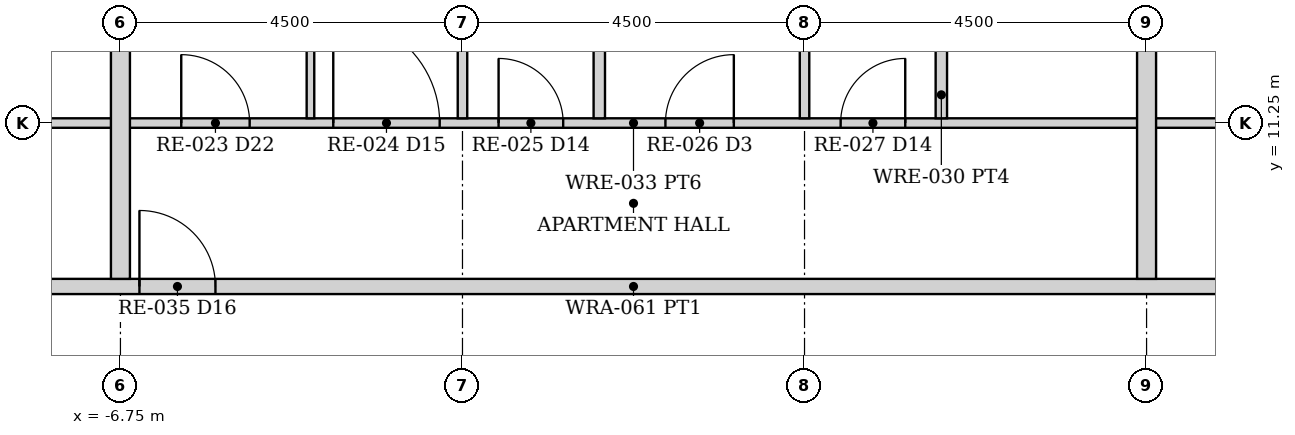
"""IFC4 building model, lengths in metres.
Left out: names, types, materials, properties, quantities, classifications, styles, units other than length and angle.
Written with IfcOpenShell. Run it as: python <this file> out.ifc"""

import sys

from ifc_helpers import new_model, si_unit, direction, frame, frame_2d, origin, place, context, subcontext, project, spatial, rectangle, extrude, element, fill, save


model = new_model("IFC4")
c1 = context("Model", 3, precision=1e-05, world=origin(), true_north=direction((0.0, 1.0)))
c2 = subcontext(c1, "Body", "Model", "MODEL_VIEW")
j1 = project(units=[si_unit("LENGTHUNIT", "METRE"), si_unit("PLANEANGLEUNIT", "RADIAN")], contexts=[c1])
p1 = place(None, origin())
s1 = spatial("IfcSite", under=j1, at=p1, CompositionType="ELEMENT")
p2 = place(p1, origin())
s2 = spatial("IfcBuilding", under=s1, at=p2, CompositionType="ELEMENT")
p3 = place(p2, frame((0.0, 0.0, 68.5)))
s3 = spatial("IfcBuildingStorey", under=s2, at=p3, CompositionType="ELEMENT", Elevation=68.5)
p4 = place(p3, frame((-24.55, 9.1, 0.0), z_axis=(0.0, 0.0, 1.0), x_axis=(1.0, 0.0, 0.0)))
e1 = element("IfcWall", 1, at=p4, inside=s3, PredefinedType="PARTITIONING", context=c2, shape_type="SweptSolid", body=[
    extrude(rectangle(XDim=49.1, YDim=0.2, at=frame_2d((24.55, 0.0))), origin(), (0.0, 0.0, 1.0), 2.373),
])
p5 = place(p4, frame((5.05, 0.0, 0.0)))
e2 = element("IfcOpeningElement", 2, at=p5, cuts=e1, PredefinedType="OPENING", context=c2, shape_type="SweptSolid", body=[
    extrude(rectangle(XDim=1.0, YDim=2.3, at=frame_2d((0.5, 1.15))), frame((0.0, 0.11, 0.0), z_axis=(0.0, -1.0, 0.0), x_axis=(1.0, 0.0, 0.0)), (0.0, 0.0, 1.0), 0.22),
])
p6 = place(p4, frame((18.05, 0.0, 0.0)))
e3 = element("IfcOpeningElement", 3, at=p6, cuts=e1, PredefinedType="OPENING", context=c2, shape_type="SweptSolid", body=[
    extrude(rectangle(XDim=1.0, YDim=2.3, at=frame_2d((0.5, 1.15))), frame((0.0, 0.11, 0.0), z_axis=(0.0, -1.0, 0.0), x_axis=(1.0, 0.0, 0.0)), (0.0, 0.0, 1.0), 0.22),
])
p7 = place(p4, frame((43.05, 0.0, 0.0)))
e4 = element("IfcOpeningElement", 4, at=p7, cuts=e1, PredefinedType="OPENING", context=c2, shape_type="SweptSolid", body=[
    extrude(rectangle(XDim=1.0, YDim=2.3, at=frame_2d((0.5, 1.15))), frame((0.0, 0.11, 0.0), z_axis=(0.0, -1.0, 0.0), x_axis=(1.0, 0.0, 0.0)), (0.0, 0.0, 1.0), 0.22),
])
p8 = place(p3, frame((-24.35, 11.25, 0.0), z_axis=(0.0, 0.0, 1.0), x_axis=(1.0, 0.0, 0.0)))
e5 = element("IfcWall", 5, at=p8, inside=s3, PredefinedType="PARTITIONING", context=c2, shape_type="SweptSolid", body=[
    extrude(rectangle(XDim=17.5, YDim=0.125, at=frame_2d((8.75, 0.0))), origin(), (0.0, 0.0, 1.0), 2.373),
])
p9 = place(p8, frame((2.625, 0.0, 0.0)))
e6 = element("IfcOpeningElement", 6, at=p9, cuts=e5, PredefinedType="OPENING", context=c2, shape_type="SweptSolid", body=[
    extrude(rectangle(XDim=0.9, YDim=2.1, at=frame_2d((0.45, 1.05))), frame((0.0, 0.073, 0.0), z_axis=(0.0, -1.0, 0.0), x_axis=(1.0, 0.0, 0.0)), (0.0, 0.0, 1.0), 0.145),
])
p10 = place(p8, frame((0.35, 0.0, 0.0)))
e7 = element("IfcOpeningElement", 7, at=p10, cuts=e5, PredefinedType="OPENING", context=c2, shape_type="SweptSolid", body=[
    extrude(rectangle(XDim=1.4, YDim=2.1, at=frame_2d((0.7, 1.05))), frame((0.0, 0.073, 0.0), z_axis=(0.0, -1.0, 0.0), x_axis=(1.0, 0.0, 0.0)), (0.0, 0.0, 1.0), 0.145),
])
p11 = place(p8, frame((4.575, 0.0, 0.0)))
e8 = element("IfcOpeningElement", 8, at=p11, cuts=e5, PredefinedType="OPENING", context=c2, shape_type="SweptSolid", body=[
    extrude(rectangle(XDim=0.85, YDim=2.1, at=frame_2d((0.425, 1.05))), frame((0.0, 0.073, 0.0), z_axis=(0.0, -1.0, 0.0), x_axis=(1.0, 0.0, 0.0)), (0.0, 0.0, 1.0), 0.145),
])
p12 = place(p8, frame((6.77, 0.0, 0.0)))
e9 = element("IfcOpeningElement", 9, at=p12, cuts=e5, PredefinedType="OPENING", context=c2, shape_type="SweptSolid", body=[
    extrude(rectangle(XDim=0.9, YDim=2.1, at=frame_2d((0.45, 1.05))), frame((0.0, 0.073, 0.0), z_axis=(0.0, -1.0, 0.0), x_axis=(1.0, 0.0, 0.0)), (0.0, 0.0, 1.0), 0.145),
])
p13 = place(p8, frame((9.075, 0.0, 0.0)))
e10 = element("IfcOpeningElement", 10, at=p13, cuts=e5, PredefinedType="OPENING", context=c2, shape_type="SweptSolid", body=[
    extrude(rectangle(XDim=0.85, YDim=2.1, at=frame_2d((0.425, 1.05))), frame((0.0, 0.073, 0.0), z_axis=(0.0, -1.0, 0.0), x_axis=(1.0, 0.0, 0.0)), (0.0, 0.0, 1.0), 0.145),
])
p14 = place(p8, frame((13.575, 0.0, 0.0)))
e11 = element("IfcOpeningElement", 11, at=p14, cuts=e5, PredefinedType="OPENING", context=c2, shape_type="SweptSolid", body=[
    extrude(rectangle(XDim=0.85, YDim=2.1, at=frame_2d((0.425, 1.05))), frame((0.0, 0.073, 0.0), z_axis=(0.0, -1.0, 0.0), x_axis=(1.0, 0.0, 0.0)), (0.0, 0.0, 1.0), 0.145),
])
p15 = place(p3, frame((-6.65, 11.25, 0.0), z_axis=(0.0, 0.0, 1.0), x_axis=(1.0, 0.0, 0.0)))
e12 = element("IfcWall", 12, at=p15, inside=s3, PredefinedType="PARTITIONING", context=c2, shape_type="SweptSolid", body=[
    extrude(rectangle(XDim=13.3, YDim=0.125, at=frame_2d((6.65, 0.0))), origin(), (0.0, 0.0, 1.0), 2.373),
])
p16 = place(p15, frame((0.7, 0.0, 0.0)))
e13 = element("IfcOpeningElement", 13, at=p16, cuts=e12, PredefinedType="OPENING", context=c2, shape_type="SweptSolid", body=[
    extrude(rectangle(XDim=0.9, YDim=2.1, at=frame_2d((0.45, 1.05))), frame((0.0, 0.073, 0.0), z_axis=(0.0, -1.0, 0.0), x_axis=(1.0, 0.0, 0.0)), (0.0, 0.0, 1.0), 0.145),
])
p17 = place(p15, frame((2.7, 0.0, 0.0)))
e14 = element("IfcOpeningElement", 14, at=p17, cuts=e12, PredefinedType="OPENING", context=c2, shape_type="SweptSolid", body=[
    extrude(rectangle(XDim=1.4, YDim=2.1, at=frame_2d((0.7, 1.05))), frame((0.0, 0.073, 0.0), z_axis=(0.0, -1.0, 0.0), x_axis=(1.0, 0.0, 0.0)), (0.0, 0.0, 1.0), 0.145),
])
p18 = place(p15, frame((4.875, 0.0, 0.0)))
e15 = element("IfcOpeningElement", 15, at=p18, cuts=e12, PredefinedType="OPENING", context=c2, shape_type="SweptSolid", body=[
    extrude(rectangle(XDim=0.85, YDim=2.1, at=frame_2d((0.425, 1.05))), frame((0.0, 0.073, 0.0), z_axis=(0.0, -1.0, 0.0), x_axis=(1.0, 0.0, 0.0)), (0.0, 0.0, 1.0), 0.145),
])
p19 = place(p15, frame((7.07, 0.0, 0.0)))
e16 = element("IfcOpeningElement", 16, at=p19, cuts=e12, PredefinedType="OPENING", context=c2, shape_type="SweptSolid", body=[
    extrude(rectangle(XDim=0.9, YDim=2.1, at=frame_2d((0.45, 1.05))), frame((0.0, 0.073, 0.0), z_axis=(0.0, -1.0, 0.0), x_axis=(1.0, 0.0, 0.0)), (0.0, 0.0, 1.0), 0.145),
])
p20 = place(p15, frame((9.375, 0.0, 0.0)))
e17 = element("IfcOpeningElement", 17, at=p20, cuts=e12, PredefinedType="OPENING", context=c2, shape_type="SweptSolid", body=[
    extrude(rectangle(XDim=0.85, YDim=2.1, at=frame_2d((0.425, 1.05))), frame((0.0, 0.073, 0.0), z_axis=(0.0, -1.0, 0.0), x_axis=(1.0, 0.0, 0.0)), (0.0, 0.0, 1.0), 0.145),
])
p21 = place(p3, frame((-4.25, 11.312, 0.0), z_axis=(0.0, 0.0, 1.0), x_axis=(0.0, 1.0, 0.0)))
e18 = element("IfcWall", 18, at=p21, inside=s3, PredefinedType="PARTITIONING", context=c2, shape_type="SweptSolid", body=[
    extrude(rectangle(XDim=4.53, YDim=0.1, at=frame_2d((2.265, 0.0))), origin(), (0.0, 0.0, 1.0), 2.373),
])
p22 = place(p3, frame((-2.25, 11.312, 0.0), z_axis=(0.0, 0.0, 1.0), x_axis=(0.0, 1.0, 0.0)))
e19 = element("IfcWall", 19, at=p22, inside=s3, PredefinedType="PARTITIONING", context=c2, shape_type="SweptSolid", body=[
    extrude(rectangle(XDim=13.038, YDim=0.125, at=frame_2d((6.519, 0.0))), origin(), (0.0, 0.0, 1.0), 2.373),
])
p23 = place(p3, frame((-0.45, 11.312, 0.0), z_axis=(0.0, 0.0, 1.0), x_axis=(0.0, 1.0, 0.0)))
e20 = element("IfcWall", 20, at=p23, inside=s3, PredefinedType="PARTITIONING", context=c2, shape_type="SweptSolid", body=[
    extrude(rectangle(XDim=3.087, YDim=0.15, at=frame_2d((1.544, 0.0))), origin(), (0.0, 0.0, 1.0), 2.373),
])
p24 = place(p23, frame((1.087, 0.0, 0.0)))
e21 = element("IfcOpeningElement", 21, at=p24, cuts=e20, PredefinedType="OPENING", context=c2, shape_type="SweptSolid", body=[
    extrude(rectangle(XDim=0.8, YDim=2.1, at=frame_2d((0.4, 1.05))), frame((0.0, 0.085, 0.0), z_axis=(0.0, -1.0, 0.0), x_axis=(1.0, 0.0, 0.0)), (0.0, 0.0, 1.0), 0.17),
])
p25 = place(p3, frame((2.25, 11.312, 0.0), z_axis=(0.0, 0.0, 1.0), x_axis=(0.0, 1.0, 0.0)))
e22 = element("IfcWall", 22, at=p25, inside=s3, PredefinedType="PARTITIONING", context=c2, shape_type="SweptSolid", body=[
    extrude(rectangle(XDim=13.038, YDim=0.125, at=frame_2d((6.519, 0.0))), origin(), (0.0, 0.0, 1.0), 2.373),
])
p26 = place(p3, frame((4.05, 11.312, 0.0), z_axis=(0.0, 0.0, 1.0), x_axis=(0.0, 1.0, 0.0)))
e23 = element("IfcWall", 23, at=p26, inside=s3, PredefinedType="PARTITIONING", context=c2, shape_type="SweptSolid", body=[
    extrude(rectangle(XDim=3.087, YDim=0.15, at=frame_2d((1.544, 0.0))), origin(), (0.0, 0.0, 1.0), 2.373),
])
p27 = place(p26, frame((1.087, 0.0, 0.0)))
e24 = element("IfcOpeningElement", 24, at=p27, cuts=e23, PredefinedType="OPENING", context=c2, shape_type="SweptSolid", body=[
    extrude(rectangle(XDim=0.8, YDim=2.1, at=frame_2d((0.4, 1.05))), frame((0.0, 0.085, 0.0), z_axis=(0.0, -1.0, 0.0), x_axis=(1.0, 0.0, 0.0)), (0.0, 0.0, 1.0), 0.17),
])
p28 = place(p3, frame((6.85, 11.25, 0.0), z_axis=(0.0, 0.0, 1.0), x_axis=(1.0, 0.0, 0.0)))
e25 = element("IfcWall", 25, at=p28, inside=s3, PredefinedType="PARTITIONING", context=c2, shape_type="SweptSolid", body=[
    extrude(rectangle(XDim=17.5, YDim=0.125, at=frame_2d((8.75, 0.0))), origin(), (0.0, 0.0, 1.0), 2.373),
])
p29 = place(p28, frame((13.975, 0.0, 0.0)))
e26 = element("IfcOpeningElement", 26, at=p29, cuts=e25, PredefinedType="OPENING", context=c2, shape_type="SweptSolid", body=[
    extrude(rectangle(XDim=0.9, YDim=2.1, at=frame_2d((0.45, 1.05))), frame((0.0, 0.073, 0.0), z_axis=(0.0, -1.0, 0.0), x_axis=(1.0, 0.0, 0.0)), (0.0, 0.0, 1.0), 0.145),
])
p30 = place(p28, frame((15.75, 0.0, 0.0)))
e27 = element("IfcOpeningElement", 27, at=p30, cuts=e25, PredefinedType="OPENING", context=c2, shape_type="SweptSolid", body=[
    extrude(rectangle(XDim=1.4, YDim=2.1, at=frame_2d((0.7, 1.05))), frame((0.0, 0.073, 0.0), z_axis=(0.0, -1.0, 0.0), x_axis=(1.0, 0.0, 0.0)), (0.0, 0.0, 1.0), 0.145),
])
p31 = place(p28, frame((12.075, 0.0, 0.0)))
e28 = element("IfcOpeningElement", 28, at=p31, cuts=e25, PredefinedType="OPENING", context=c2, shape_type="SweptSolid", body=[
    extrude(rectangle(XDim=0.85, YDim=2.1, at=frame_2d((0.425, 1.05))), frame((0.0, 0.073, 0.0), z_axis=(0.0, -1.0, 0.0), x_axis=(1.0, 0.0, 0.0)), (0.0, 0.0, 1.0), 0.145),
])
p32 = place(p28, frame((9.83, 0.0, 0.0)))
e29 = element("IfcOpeningElement", 29, at=p32, cuts=e25, PredefinedType="OPENING", context=c2, shape_type="SweptSolid", body=[
    extrude(rectangle(XDim=0.9, YDim=2.1, at=frame_2d((0.45, 1.05))), frame((0.0, 0.073, 0.0), z_axis=(0.0, -1.0, 0.0), x_axis=(1.0, 0.0, 0.0)), (0.0, 0.0, 1.0), 0.145),
])
p33 = place(p28, frame((7.575, 0.0, 0.0)))
e30 = element("IfcOpeningElement", 30, at=p33, cuts=e25, PredefinedType="OPENING", context=c2, shape_type="SweptSolid", body=[
    extrude(rectangle(XDim=0.85, YDim=2.1, at=frame_2d((0.425, 1.05))), frame((0.0, 0.073, 0.0), z_axis=(0.0, -1.0, 0.0), x_axis=(1.0, 0.0, 0.0)), (0.0, 0.0, 1.0), 0.145),
])
p34 = place(p28, frame((3.075, 0.0, 0.0)))
e31 = element("IfcOpeningElement", 31, at=p34, cuts=e25, PredefinedType="OPENING", context=c2, shape_type="SweptSolid", body=[
    extrude(rectangle(XDim=0.85, YDim=2.1, at=frame_2d((0.425, 1.05))), frame((0.0, 0.073, 0.0), z_axis=(0.0, -1.0, 0.0), x_axis=(1.0, 0.0, 0.0)), (0.0, 0.0, 1.0), 0.145),
])
for number, where, z_axis, x_axis in (
    (32, (-6.75, 9.2, 0.0), (0.0, 0.0, 1.0), (0.0, 1.0, 0.0)),
    (33, (6.75, 9.2, 0.0), (0.0, 0.0, 1.0), (0.0, 1.0, 0.0)),
):
    element("IfcWall", number, at=place(p3, frame(where, z_axis=z_axis, x_axis=x_axis)), inside=s3, PredefinedType="PARTITIONING", context=c2, shape_type="SweptSolid", body=[
        extrude(rectangle(XDim=15.15, YDim=0.25, at=frame_2d((7.575, 0.0))), origin(), (0.0, 0.0, 1.0), 2.373),
    ])
p35 = place(p6, origin())
e34 = element("IfcDoor", 34, at=p35, inside=s3, OperationType="SINGLE_SWING_LEFT", PredefinedType="DOOR", context=c2, shape_type="SweptSolid", body=[
    extrude(rectangle(XDim=1.0, YDim=2.3, at=frame_2d((0.5, 1.15))), frame((0.0, 0.025, 0.0), z_axis=(0.0, -1.0, 0.0), x_axis=(1.0, 0.0, 0.0)), (0.0, 0.0, 1.0), 0.05),
])
fill(e3, e34)
p36 = place(p16, origin())
e35 = element("IfcDoor", 35, at=p36, inside=s3, OperationType="SINGLE_SWING_LEFT", PredefinedType="DOOR", context=c2, shape_type="SweptSolid", body=[
    extrude(rectangle(XDim=0.9, YDim=2.1, at=frame_2d((0.45, 1.05))), frame((0.0, 0.025, 0.0), z_axis=(0.0, -1.0, 0.0), x_axis=(1.0, 0.0, 0.0)), (0.0, 0.0, 1.0), 0.05),
])
fill(e13, e35)
p37 = place(p17, origin())
e36 = element("IfcDoor", 36, at=p37, inside=s3, OperationType="SINGLE_SWING_LEFT", PredefinedType="DOOR", context=c2, shape_type="SweptSolid", body=[
    extrude(rectangle(XDim=1.4, YDim=2.1, at=frame_2d((0.7, 1.05))), frame((0.0, 0.025, 0.0), z_axis=(0.0, -1.0, 0.0), x_axis=(1.0, 0.0, 0.0)), (0.0, 0.0, 1.0), 0.05),
])
fill(e14, e36)
p38 = place(p18, origin())
e37 = element("IfcDoor", 37, at=p38, inside=s3, OperationType="SINGLE_SWING_LEFT", PredefinedType="DOOR", context=c2, shape_type="SweptSolid", body=[
    extrude(rectangle(XDim=0.85, YDim=2.1, at=frame_2d((0.425, 1.05))), frame((0.0, 0.025, 0.0), z_axis=(0.0, -1.0, 0.0), x_axis=(1.0, 0.0, 0.0)), (0.0, 0.0, 1.0), 0.05),
])
fill(e15, e37)
p39 = place(p19, origin())
e38 = element("IfcDoor", 38, at=p39, inside=s3, OperationType="SINGLE_SWING_RIGHT", PredefinedType="DOOR", context=c2, shape_type="SweptSolid", body=[
    extrude(rectangle(XDim=0.9, YDim=2.1, at=frame_2d((0.45, 1.05))), frame((0.0, 0.025, 0.0), z_axis=(0.0, -1.0, 0.0), x_axis=(1.0, 0.0, 0.0)), (0.0, 0.0, 1.0), 0.05),
])
fill(e16, e38)
p40 = place(p20, origin())
e39 = element("IfcDoor", 39, at=p40, inside=s3, OperationType="SINGLE_SWING_RIGHT", PredefinedType="DOOR", context=c2, shape_type="SweptSolid", body=[
    extrude(rectangle(XDim=0.85, YDim=2.1, at=frame_2d((0.425, 1.05))), frame((0.0, 0.025, 0.0), z_axis=(0.0, -1.0, 0.0), x_axis=(1.0, 0.0, 0.0)), (0.0, 0.0, 1.0), 0.05),
])
fill(e17, e39)
save(model, sys.argv[1])
